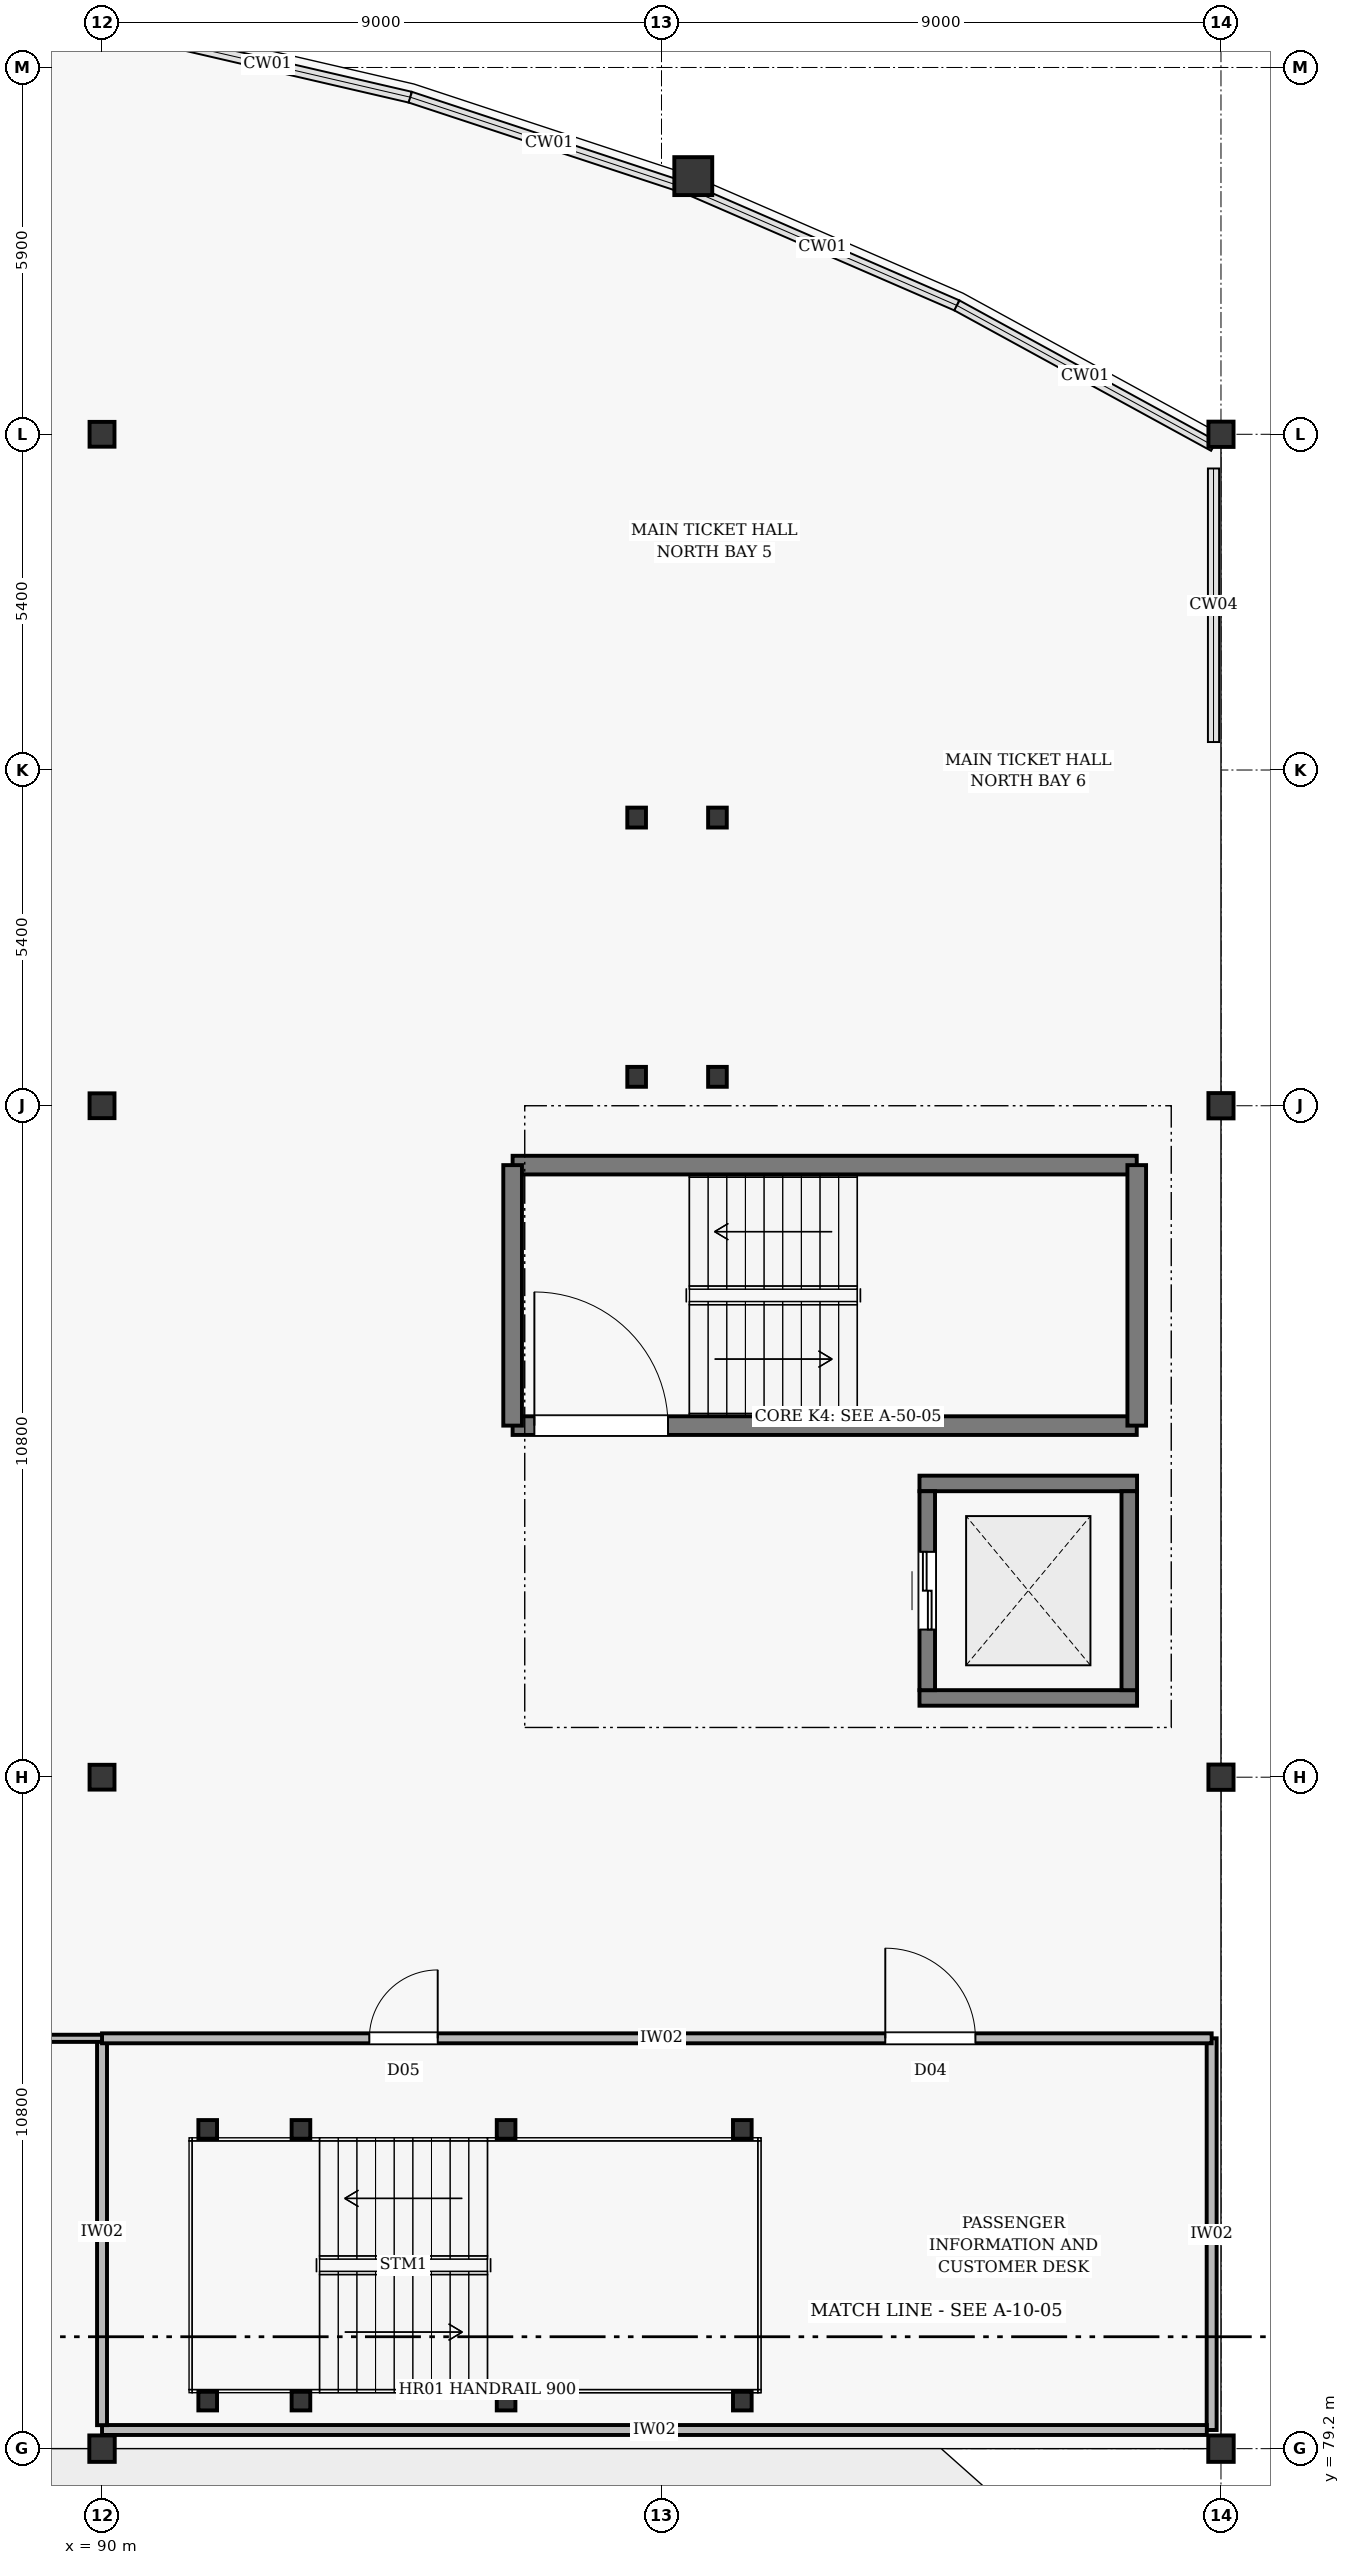
"""IFC4 building model, lengths in metres.
Left out: names, types, materials, properties, quantities, classifications, styles, units other than length and angle.
Written with IfcOpenShell. Run it as: python <this file> out.ifc"""

import sys

from ifc_helpers import new_model, si_unit, direction, frame, frame_2d, origin, origin_2d, place, context, subcontext, project, spatial, rectangle, hollow_circle, i_section, extrude, element, fill, save


model = new_model("IFC4")
c1 = context("Model", 3, precision=1e-05, world=origin(), true_north=direction((0.0, 1.0)))
c2 = subcontext(c1, "Body", "Model", "MODEL_VIEW")
j1 = project(units=[si_unit("LENGTHUNIT", "METRE"), si_unit("PLANEANGLEUNIT", "RADIAN")], contexts=[c1])
p1 = place(None, origin())
s1 = spatial("IfcSite", under=j1, at=p1, CompositionType="ELEMENT")
p2 = place(p1, origin())
s2 = spatial("IfcBuilding", under=s1, at=p2, CompositionType="ELEMENT")
p3 = place(p2, origin())
s3 = spatial("IfcBuildingStorey", under=s2, at=p3, CompositionType="ELEMENT", Elevation=0.0)
p4 = place(p3, frame((90.0, 79.2, 0.0), z_axis=(0.0, 0.0, 1.0), x_axis=(1.0, 0.0, 0.0)))
e1 = element("IfcColumn", 1, at=p4, inside=s3, PredefinedType="COLUMN", context=c2, shape_type="SweptSolid", body=[
    extrude(i_section(OverallWidth=0.409, OverallDepth=0.425, WebThickness=0.025, FlangeThickness=0.039, at=origin_2d()), origin(), (0.0, 0.0, 1.0), 6.6),
])
for number, where, z_axis, x_axis in (
    (2, (90.0, 90.0, 0.0), (0.0, 0.0, 1.0), (1.0, 0.0, 0.0)),
    (3, (90.0, 100.8, 0.0), (0.0, 0.0, 1.0), (1.0, 0.0, 0.0)),
    (4, (90.0, 111.6, 0.0), (0.0, 0.0, 1.0), (1.0, 0.0, 0.0)),
):
    element("IfcColumn", number, at=place(p3, frame(where, z_axis=z_axis, x_axis=x_axis)), inside=s3, PredefinedType="COLUMN", context=c2, shape_type="SweptSolid", body=[
        extrude(i_section(OverallWidth=0.401, OverallDepth=0.399, WebThickness=0.019, FlangeThickness=0.029, at=origin_2d()), origin(), (0.0, 0.0, 1.0), 6.6),
    ])
p5 = place(p3, frame((108.0, 79.2, 0.0), z_axis=(0.0, 0.0, 1.0), x_axis=(1.0, 0.0, 0.0)))
e5 = element("IfcColumn", 5, at=p5, inside=s3, PredefinedType="COLUMN", context=c2, shape_type="SweptSolid", body=[
    extrude(i_section(OverallWidth=0.409, OverallDepth=0.425, WebThickness=0.025, FlangeThickness=0.039, at=origin_2d()), origin(), (0.0, 0.0, 1.0), 6.6),
])
for number, where, z_axis, x_axis in (
    (6, (108.0, 90.0, 0.0), (0.0, 0.0, 1.0), (1.0, 0.0, 0.0)),
    (7, (108.0, 100.8, 0.0), (0.0, 0.0, 1.0), (1.0, 0.0, 0.0)),
    (8, (108.0, 111.6, 0.0), (0.0, 0.0, 1.0), (1.0, 0.0, 0.0)),
):
    element("IfcColumn", number, at=place(p3, frame(where, z_axis=z_axis, x_axis=x_axis)), inside=s3, PredefinedType="COLUMN", context=c2, shape_type="SweptSolid", body=[
        extrude(i_section(OverallWidth=0.404, OverallDepth=0.407, WebThickness=0.021, FlangeThickness=0.032, at=origin_2d()), origin(), (0.0, 0.0, 1.0), 6.6),
    ])
p6 = place(p3, frame((99.511, 115.753, 0.0), z_axis=(0.0, 0.0, 1.0), x_axis=(1.0, 0.0, 0.0)))
e9 = element("IfcColumn", 9, at=p6, inside=s3, PredefinedType="COLUMN", context=c2, shape_type="SweptSolid", body=[
    extrude(hollow_circle(Radius=0.305, WallThickness=0.02, at=origin_2d()), origin(), (0.0, 0.0, 1.0), 6.6),
])
p7 = place(p3, frame((96.605, 95.655, 0.0), z_axis=(0.0, 0.0, 1.0), x_axis=(1.0, 0.0, 0.0)))
e10 = element("IfcWall", 10, at=p7, inside=s3, PredefinedType="SOLIDWALL", context=c2, shape_type="SweptSolid", body=[
    extrude(rectangle(XDim=10.04, YDim=0.3, at=frame_2d((5.02, 0.0))), origin(), (0.0, 0.0, 1.0), 6.6),
])
p8 = place(p7, frame((0.35, 0.0, 0.005)))
e11 = element("IfcOpeningElement", 11, at=p8, cuts=e10, PredefinedType="OPENING", context=c2, shape_type="SweptSolid", body=[
    extrude(rectangle(XDim=2.15, YDim=2.2, at=frame_2d((1.075, 1.1))), frame((0.0, 0.162, 0.0), z_axis=(0.0, -1.0, 0.0), x_axis=(1.0, 0.0, 0.0)), (0.0, 0.0, 1.0), 0.324),
])
p9 = place(p3, frame((96.605, 99.845, 0.0), z_axis=(0.0, 0.0, 1.0), x_axis=(1.0, 0.0, 0.0)))
e12 = element("IfcWall", 12, at=p9, inside=s3, PredefinedType="SOLIDWALL", context=c2, shape_type="SweptSolid", body=[
    extrude(rectangle(XDim=10.04, YDim=0.3, at=frame_2d((5.02, 0.0))), origin(), (0.0, 0.0, 1.0), 6.6),
])
for number, where, z_axis, x_axis in (
    (13, (96.605, 95.655, 0.0), (0.0, 0.0, 1.0), (0.0, 1.0, 0.0)),
    (14, (106.645, 95.655, 0.0), (0.0, 0.0, 1.0), (0.0, 1.0, 0.0)),
):
    element("IfcWall", number, at=place(p3, frame(where, z_axis=z_axis, x_axis=x_axis)), inside=s3, PredefinedType="SOLIDWALL", context=c2, shape_type="SweptSolid", body=[
        extrude(rectangle(XDim=4.19, YDim=0.3, at=frame_2d((2.095, 0.0))), origin(), (0.0, 0.0, 1.0), 6.6),
    ])
for number, where, z_axis, x_axis in (
    (15, (91.7, 79.965, 0.0), (0.0, 0.0, 1.0), (1.0, 0.0, 0.0)),
    (16, (93.2, 79.965, 0.0), (0.0, 0.0, 1.0), (1.0, 0.0, 0.0)),
    (17, (91.7, 84.335, 0.0), (0.0, 0.0, 1.0), (1.0, 0.0, 0.0)),
    (18, (93.2, 84.335, 0.0), (0.0, 0.0, 1.0), (1.0, 0.0, 0.0)),
):
    element("IfcColumn", number, at=place(p3, frame(where, z_axis=z_axis, x_axis=x_axis)), inside=s3, PredefinedType="COLUMN", context=c2, shape_type="SweptSolid", body=[
        extrude(i_section(OverallWidth=0.3, OverallDepth=0.3, WebThickness=0.011, FlangeThickness=0.019, at=origin_2d()), origin(), (0.0, 0.0, 1.0), 3.28),
    ])
for number, where, z_axis, x_axis in (
    (19, (96.5, 79.965, 0.0), (0.0, 0.0, 1.0), (1.0, 0.0, 0.0)),
    (20, (100.3, 79.965, 0.0), (0.0, 0.0, 1.0), (1.0, 0.0, 0.0)),
    (21, (96.5, 84.335, 0.0), (0.0, 0.0, 1.0), (1.0, 0.0, 0.0)),
    (22, (100.3, 84.335, 0.0), (0.0, 0.0, 1.0), (1.0, 0.0, 0.0)),
):
    element("IfcColumn", number, at=place(p3, frame(where, z_axis=z_axis, x_axis=x_axis)), inside=s3, PredefinedType="COLUMN", context=c2, shape_type="SweptSolid", body=[
        extrude(i_section(OverallWidth=0.3, OverallDepth=0.3, WebThickness=0.011, FlangeThickness=0.019, at=origin_2d()), origin(), (0.0, 0.0, 1.0), 4.93),
    ])
for number, where, z_axis, x_axis in (
    (23, (98.6, 101.265, 0.0), (0.0, 0.0, 1.0), (1.0, 0.0, 0.0)),
    (24, (99.9, 101.265, 0.0), (0.0, 0.0, 1.0), (1.0, 0.0, 0.0)),
    (25, (98.6, 105.435, 0.0), (0.0, 0.0, 1.0), (1.0, 0.0, 0.0)),
    (26, (99.9, 105.435, 0.0), (0.0, 0.0, 1.0), (1.0, 0.0, 0.0)),
):
    element("IfcColumn", number, at=place(p3, frame(where, z_axis=z_axis, x_axis=x_axis)), inside=s3, PredefinedType="COLUMN", context=c2, shape_type="SweptSolid", body=[
        extrude(i_section(OverallWidth=0.3, OverallDepth=0.32, WebThickness=0.011, FlangeThickness=0.021, at=origin_2d()), origin(), (0.0, 0.0, 1.0), 6.32),
    ])
for number, where, z_axis, x_axis in (
    (27, (103.15, 91.275, 0.0), (0.0, 0.0, 1.0), (1.0, 0.0, 0.0)),
    (28, (103.15, 94.725, 0.0), (0.0, 0.0, 1.0), (1.0, 0.0, 0.0)),
):
    element("IfcWall", number, at=place(p3, frame(where, z_axis=z_axis, x_axis=x_axis)), inside=s3, PredefinedType="SOLIDWALL", context=c2, shape_type="SweptSolid", body=[
        extrude(rectangle(XDim=3.5, YDim=0.25, at=frame_2d((1.75, 0.0))), origin(), (0.0, 0.0, 1.0), 6.6),
    ])
p10 = place(p3, frame((103.275, 91.4, 0.0), z_axis=(0.0, 0.0, 1.0), x_axis=(0.0, 1.0, 0.0)))
e29 = element("IfcWall", 29, at=p10, inside=s3, PredefinedType="SOLIDWALL", context=c2, shape_type="SweptSolid", body=[
    extrude(rectangle(XDim=3.2, YDim=0.25, at=frame_2d((1.6, 0.0))), origin(), (0.0, 0.0, 1.0), 6.6),
])
p11 = place(p10, frame((0.975, 0.0, 0.005)))
e30 = element("IfcOpeningElement", 30, at=p11, cuts=e29, PredefinedType="OPENING", context=c2, shape_type="SweptSolid", body=[
    extrude(rectangle(XDim=1.25, YDim=2.2, at=frame_2d((0.625, 1.1))), frame((0.0, 0.137, 0.0), z_axis=(0.0, -1.0, 0.0), x_axis=(1.0, 0.0, 0.0)), (0.0, 0.0, 1.0), 0.274),
])
p12 = place(p3, frame((106.525, 91.4, 0.0), z_axis=(0.0, 0.0, 1.0), x_axis=(0.0, 1.0, 0.0)))
e31 = element("IfcWall", 31, at=p12, inside=s3, PredefinedType="SOLIDWALL", context=c2, shape_type="SweptSolid", body=[
    extrude(rectangle(XDim=3.2, YDim=0.25, at=frame_2d((1.6, 0.0))), origin(), (0.0, 0.0, 1.0), 6.6),
])
p13 = place(p3, frame((107.85, 79.5, 0.0), z_axis=(0.0, 0.0, 1.0), x_axis=(0.0, 1.0, 0.0)))
e32 = element("IfcWall", 32, at=p13, inside=s3, PredefinedType="PARTITIONING", context=c2, shape_type="SweptSolid", body=[
    extrude(rectangle(XDim=6.3, YDim=0.16, at=frame_2d((3.15, 0.0))), origin(), (0.0, 0.0, 1.0), 4.68),
])
p14 = place(p3, frame((90.0, 79.5, 0.0), z_axis=(0.0, 0.0, 1.0), x_axis=(1.0, 0.0, 0.0)))
e33 = element("IfcWall", 33, at=p14, inside=s3, PredefinedType="PARTITIONING", context=c2, shape_type="SweptSolid", body=[
    extrude(rectangle(XDim=17.772, YDim=0.16, at=frame_2d((8.886, 0.0))), origin(), (0.0, 0.0, 1.0), 4.68),
])
p15 = place(p3, frame((90.0, 79.578, 0.0), z_axis=(0.0, 0.0, 1.0), x_axis=(0.0, 1.0, 0.0)))
e34 = element("IfcWall", 34, at=p15, inside=s3, PredefinedType="PARTITIONING", context=c2, shape_type="SweptSolid", body=[
    extrude(rectangle(XDim=6.222, YDim=0.16, at=frame_2d((3.111, 0.0))), origin(), (0.0, 0.0, 1.0), 4.68),
])
p16 = place(p3, frame((90.0, 85.8, 0.0), z_axis=(0.0, 0.0, 1.0), x_axis=(1.0, 0.0, 0.0)))
e35 = element("IfcWall", 35, at=p16, inside=s3, PredefinedType="PARTITIONING", context=c2, shape_type="SweptSolid", body=[
    extrude(rectangle(XDim=17.85, YDim=0.16, at=frame_2d((8.925, 0.0))), origin(), (0.0, 0.0, 1.0), 5.84),
])
p17 = place(p16, frame((4.3, 0.0, 0.005)))
e36 = element("IfcOpeningElement", 36, at=p17, cuts=e35, PredefinedType="OPENING", context=c2, shape_type="SweptSolid", body=[
    extrude(rectangle(XDim=1.1, YDim=2.1, at=frame_2d((0.55, 1.05))), frame((0.0, 0.092, 0.0), z_axis=(0.0, -1.0, 0.0), x_axis=(1.0, 0.0, 0.0)), (0.0, 0.0, 1.0), 0.184),
])
p18 = place(p16, frame((12.6, 0.0, 0.005)))
e37 = element("IfcOpeningElement", 37, at=p18, cuts=e35, PredefinedType="OPENING", context=c2, shape_type="SweptSolid", body=[
    extrude(rectangle(XDim=1.45, YDim=2.15, at=frame_2d((0.725, 1.075))), frame((0.0, 0.092, 0.0), z_axis=(0.0, -1.0, 0.0), x_axis=(1.0, 0.0, 0.0)), (0.0, 0.0, 1.0), 0.184),
])
p19 = place(p3, frame((72.0, 85.8, 0.0), z_axis=(0.0, 0.0, 1.0), x_axis=(1.0, 0.0, 0.0)))
e38 = element("IfcWall", 38, at=p19, inside=s3, PredefinedType="PARTITIONING", context=c2, shape_type="SweptSolid", body=[
    extrude(rectangle(XDim=18.0, YDim=0.115, at=frame_2d((9.0, 0.0))), origin(), (0.0, 0.0, 1.0), 5.84),
])
p20 = place(p19, frame((2.0, 0.0, 0.005)))
e39 = element("IfcOpeningElement", 39, at=p20, cuts=e38, PredefinedType="OPENING", context=c2, shape_type="SweptSolid", body=[
    extrude(rectangle(XDim=2.3, YDim=2.4, at=frame_2d((1.15, 1.2))), frame((0.0, 0.069, 0.0), z_axis=(0.0, -1.0, 0.0), x_axis=(1.0, 0.0, 0.0)), (0.0, 0.0, 1.0), 0.139),
])
p21 = place(p19, frame((8.0, 0.0, 0.005)))
e40 = element("IfcOpeningElement", 40, at=p21, cuts=e38, PredefinedType="OPENING", context=c2, shape_type="SweptSolid", body=[
    extrude(rectangle(XDim=2.3, YDim=2.4, at=frame_2d((1.15, 1.2))), frame((0.0, 0.069, 0.0), z_axis=(0.0, -1.0, 0.0), x_axis=(1.0, 0.0, 0.0)), (0.0, 0.0, 1.0), 0.139),
])
p22 = place(p19, frame((13.6, 0.0, 0.005)))
e41 = element("IfcOpeningElement", 41, at=p22, cuts=e38, PredefinedType="OPENING", context=c2, shape_type="SweptSolid", body=[
    extrude(rectangle(XDim=1.95, YDim=2.3, at=frame_2d((0.975, 1.15))), frame((0.0, 0.069, 0.0), z_axis=(0.0, -1.0, 0.0), x_axis=(1.0, 0.0, 0.0)), (0.0, 0.0, 1.0), 0.139),
])
p23 = place(p8, origin())
e42 = element("IfcDoor", 42, at=p23, inside=s3, OperationType="SINGLE_SWING_LEFT", PredefinedType="DOOR", context=c2, shape_type="SweptSolid", body=[
    extrude(rectangle(XDim=2.15, YDim=2.2, at=frame_2d((1.075, 1.1))), frame((0.0, 0.025, 0.0), z_axis=(0.0, -1.0, 0.0), x_axis=(1.0, 0.0, 0.0)), (0.0, 0.0, 1.0), 0.05),
])
fill(e11, e42)
p24 = place(p11, origin())
e43 = element("IfcDoor", 43, at=p24, inside=s3, OperationType="SLIDING_TO_LEFT", PredefinedType="DOOR", context=c2, shape_type="SweptSolid", body=[
    extrude(rectangle(XDim=1.25, YDim=2.2, at=frame_2d((0.625, 1.1))), frame((0.0, 0.025, 0.0), z_axis=(0.0, -1.0, 0.0), x_axis=(1.0, 0.0, 0.0)), (0.0, 0.0, 1.0), 0.05),
])
fill(e30, e43)
p25 = place(p17, origin())
e44 = element("IfcDoor", 44, at=p25, inside=s3, OperationType="SINGLE_SWING_RIGHT", PredefinedType="DOOR", context=c2, shape_type="SweptSolid", body=[
    extrude(rectangle(XDim=1.1, YDim=2.1, at=frame_2d((0.55, 1.05))), frame((0.0, 0.025, 0.0), z_axis=(0.0, -1.0, 0.0), x_axis=(1.0, 0.0, 0.0)), (0.0, 0.0, 1.0), 0.05),
])
fill(e36, e44)
p26 = place(p18, origin())
e45 = element("IfcDoor", 45, at=p26, inside=s3, OperationType="SINGLE_SWING_LEFT", PredefinedType="DOOR", context=c2, shape_type="SweptSolid", body=[
    extrude(rectangle(XDim=1.45, YDim=2.15, at=frame_2d((0.725, 1.075))), frame((0.0, 0.025, 0.0), z_axis=(0.0, -1.0, 0.0), x_axis=(1.0, 0.0, 0.0)), (0.0, 0.0, 1.0), 0.05),
])
fill(e37, e45)
save(model, sys.argv[1])
